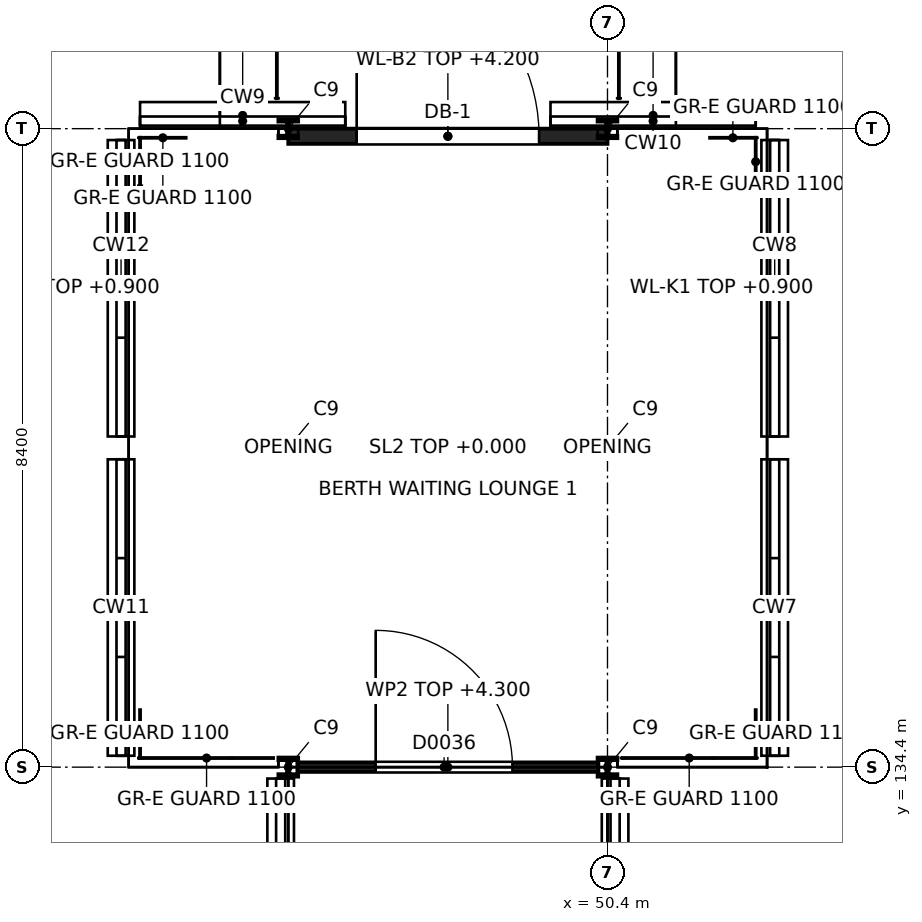
"""IFC4 building model, lengths in metres.
Left out: names, types, materials, properties, quantities, classifications, styles, units other than length and angle.
Written with IfcOpenShell. Run it as: python <this file> out.ifc"""

import sys

from ifc_helpers import new_model, si_unit, direction, frame, frame_2d, origin, origin_2d, place, context, subcontext, project, spatial, rectangle, i_section, extrude, element, fill, save


model = new_model("IFC4")
c1 = context("Model", 3, precision=1e-05, world=origin(), true_north=direction((0.0, 1.0)))
c2 = subcontext(c1, "Body", "Model", "MODEL_VIEW")
j1 = project(units=[si_unit("LENGTHUNIT", "METRE"), si_unit("PLANEANGLEUNIT", "RADIAN")], contexts=[c1])
p1 = place(None, origin())
s1 = spatial("IfcSite", under=j1, at=p1, CompositionType="ELEMENT")
p2 = place(p1, origin())
s2 = spatial("IfcBuilding", under=s1, at=p2, CompositionType="ELEMENT")
p3 = place(p2, origin())
s3 = spatial("IfcBuildingStorey", under=s2, at=p3, CompositionType="ELEMENT", Elevation=0.0)
for number, where, z_axis, x_axis in (
    (1, (46.2, 134.4, -0.45), (0.0, 0.0, 1.0), (1.0, 0.0, 0.0)),
    (2, (50.4, 134.4, -0.45), (0.0, 0.0, 1.0), (1.0, 0.0, 0.0)),
    (3, (46.2, 138.6, -0.45), (0.0, 0.0, 1.0), (1.0, 0.0, 0.0)),
    (4, (50.4, 138.6, -0.45), (0.0, 0.0, 1.0), (1.0, 0.0, 0.0)),
    (5, (46.2, 142.8, -0.45), (0.0, 0.0, 1.0), (1.0, 0.0, 0.0)),
    (6, (50.4, 142.8, -0.45), (0.0, 0.0, 1.0), (1.0, 0.0, 0.0)),
):
    element("IfcColumn", number, at=place(p3, frame(where, z_axis=z_axis, x_axis=x_axis)), inside=s3, PredefinedType="COLUMN", context=c2, shape_type="SweptSolid", body=[
        extrude(i_section(OverallWidth=0.24, OverallDepth=0.23, WebThickness=0.008, FlangeThickness=0.012, at=origin_2d()), origin(), (0.0, 0.0, 1.0), 4.95),
    ])
p4 = place(p3, frame((46.2, 142.7, 0.0), z_axis=(0.0, 0.0, 1.0), x_axis=(1.0, 0.0, 0.0)))
e7 = element("IfcWall", 7, at=p4, inside=s3, PredefinedType="SOLIDWALL", context=c2, shape_type="SweptSolid", body=[
    extrude(rectangle(XDim=4.2, YDim=0.2, at=frame_2d((2.1, 0.0))), origin(), (0.0, 0.0, 1.0), 4.2),
])
p5 = place(p4, frame((0.9, 0.0, 0.0)))
e8 = element("IfcOpeningElement", 8, at=p5, cuts=e7, PredefinedType="OPENING", context=c2, shape_type="SweptSolid", body=[
    extrude(rectangle(XDim=2.4, YDim=2.4, at=frame_2d((1.2, 1.2))), frame((0.0, 0.1, 0.0), z_axis=(0.0, -1.0, 0.0), x_axis=(1.0, 0.0, 0.0)), (0.0, 0.0, 1.0), 0.2),
])
for number, where, z_axis, x_axis in (
    (9, (50.5, 130.35, 0.0), (0.0, 0.0, 1.0), (0.0, 1.0, 0.0)),
    (10, (52.6, 134.55, 0.0), (0.0, 0.0, 1.0), (0.0, 1.0, 0.0)),
    (11, (52.6, 138.75, 0.0), (0.0, 0.0, 1.0), (0.0, 1.0, 0.0)),
):
    element("IfcWall", number, at=place(p3, frame(where, z_axis=z_axis, x_axis=x_axis)), inside=s3, PredefinedType="SOLIDWALL", context=c2, shape_type="SweptSolid", body=[
        extrude(rectangle(XDim=3.9, YDim=0.35, at=frame_2d((1.95, 0.0))), origin(), (0.0, 0.0, 1.0), 0.9),
    ])
p6 = place(p3, frame((44.25, 142.975, 0.0), z_axis=(0.0, 0.0, 1.0), x_axis=(1.0, 0.0, 0.0)))
e12 = element("IfcWall", 12, at=p6, inside=s3, PredefinedType="SOLIDWALL", context=c2, shape_type="SweptSolid", body=[
    extrude(rectangle(XDim=2.7, YDim=0.35, at=frame_2d((1.35, 0.0))), origin(), (0.0, 0.0, 1.0), 0.9),
])
p7 = place(p3, frame((49.65, 142.975, 0.0), z_axis=(0.0, 0.0, 1.0), x_axis=(1.0, 0.0, 0.0)))
e13 = element("IfcWall", 13, at=p7, inside=s3, PredefinedType="SOLIDWALL", context=c2, shape_type="SweptSolid", body=[
    extrude(rectangle(XDim=2.7, YDim=0.35, at=frame_2d((1.35, 0.0))), origin(), (0.0, 0.0, 1.0), 0.9),
])
for number, where, z_axis, x_axis in (
    (14, (44.0, 134.55, 0.0), (0.0, 0.0, 1.0), (0.0, 1.0, 0.0)),
    (15, (44.0, 138.75, 0.0), (0.0, 0.0, 1.0), (0.0, 1.0, 0.0)),
    (16, (46.1, 130.35, 0.0), (0.0, 0.0, 1.0), (0.0, 1.0, 0.0)),
):
    element("IfcWall", number, at=place(p3, frame(where, z_axis=z_axis, x_axis=x_axis)), inside=s3, PredefinedType="SOLIDWALL", context=c2, shape_type="SweptSolid", body=[
        extrude(rectangle(XDim=3.9, YDim=0.35, at=frame_2d((1.95, 0.0))), origin(), (0.0, 0.0, 1.0), 0.9),
    ])
p8 = place(p3, frame((46.32, 134.4, 0.0), z_axis=(0.0, 0.0, 1.0), x_axis=(1.0, 0.0, 0.0)))
e17 = element("IfcWall", 17, at=p8, inside=s3, PredefinedType="PARTITIONING", context=c2, shape_type="SweptSolid", body=[
    extrude(rectangle(XDim=3.96, YDim=0.125, at=frame_2d((1.98, 0.0))), origin(), (0.0, 0.0, 1.0), 4.3),
])
p9 = place(p8, frame((1.03, 0.0, 0.0)))
e18 = element("IfcOpeningElement", 18, at=p9, cuts=e17, PredefinedType="OPENING", context=c2, shape_type="SweptSolid", body=[
    extrude(rectangle(XDim=1.8, YDim=2.1, at=frame_2d((0.9, 1.05))), frame((0.0, 0.062, 0.0), z_axis=(0.0, -1.0, 0.0), x_axis=(1.0, 0.0, 0.0)), (0.0, 0.0, 1.0), 0.125),
])
p10 = place(p5, origin())
e19 = element("IfcDoor", 19, at=p10, inside=s3, OperationType="DOUBLE_DOOR_SINGLE_SWING", PredefinedType="DOOR", context=c2, shape_type="SweptSolid", body=[
    extrude(rectangle(XDim=2.4, YDim=2.4, at=frame_2d((1.2, 1.2))), frame((0.0, 0.025, 0.0), z_axis=(0.0, -1.0, 0.0), x_axis=(1.0, 0.0, 0.0)), (0.0, 0.0, 1.0), 0.05),
])
fill(e8, e19)
p11 = place(p9, origin())
e20 = element("IfcDoor", 20, at=p11, inside=s3, OperationType="DOUBLE_DOOR_DOUBLE_SWING", PredefinedType="DOOR", context=c2, shape_type="SweptSolid", body=[
    extrude(rectangle(XDim=1.8, YDim=2.1, at=frame_2d((0.9, 1.05))), frame((0.0, 0.025, 0.0), z_axis=(0.0, -1.0, 0.0), x_axis=(1.0, 0.0, 0.0)), (0.0, 0.0, 1.0), 0.05),
])
fill(e18, e20)
save(model, sys.argv[1])
